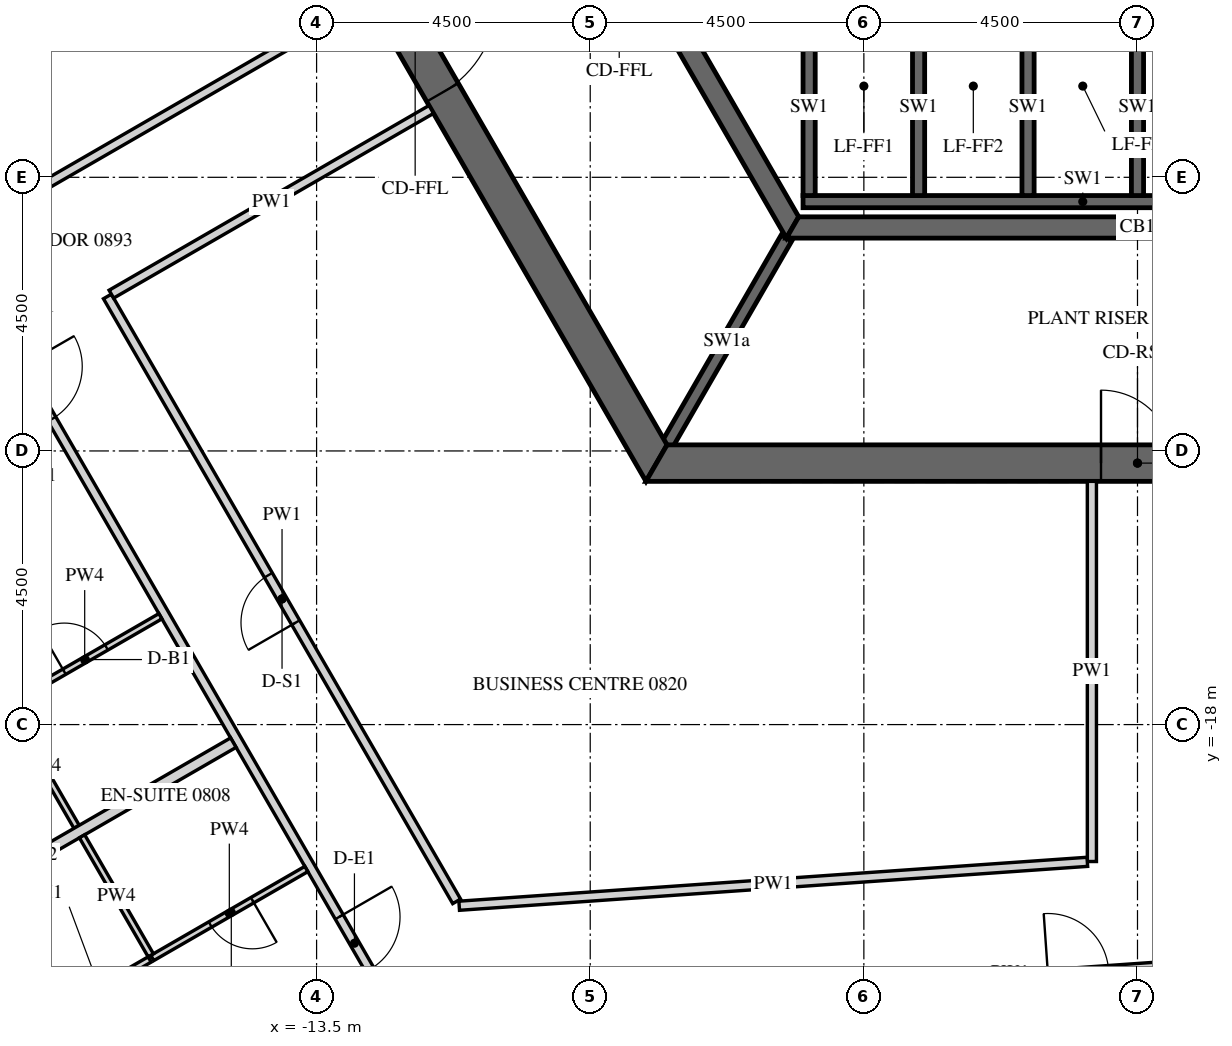
"""IFC4 building model, lengths in metres.
Left out: names, types, materials, properties, quantities, classifications, styles, units other than length and angle.
Written with IfcOpenShell. Run it as: python <this file> out.ifc"""

import sys

from ifc_helpers import new_model, si_unit, direction, frame, frame_2d, origin, place, context, subcontext, project, spatial, polyline, rectangle, outline, extrude, element, fill, save


model = new_model("IFC4")
c1 = context("Model", 3, precision=1e-05, world=origin(), true_north=direction((0.0, 1.0)))
c2 = subcontext(c1, "Body", "Model", "MODEL_VIEW")
j1 = project(units=[si_unit("LENGTHUNIT", "METRE"), si_unit("PLANEANGLEUNIT", "RADIAN")], contexts=[c1])
p1 = place(None, origin())
s1 = spatial("IfcSite", under=j1, at=p1, CompositionType="ELEMENT")
p2 = place(p1, origin())
s2 = spatial("IfcBuilding", under=s1, at=p2, CompositionType="ELEMENT")
p3 = place(p2, frame((0.0, 0.0, 111.6)))
s3 = spatial("IfcBuildingStorey", under=s2, at=p3, CompositionType="ELEMENT", Elevation=111.6)
p4 = place(p3, frame((-32.655, -2.89, -0.15), z_axis=(0.0, 0.0, 1.0), x_axis=(0.499997711317, -0.866026725152, 0.0)))
e1 = element("IfcWall", 1, at=p4, inside=s3, PredefinedType="SOLIDWALL", context=c2, shape_type="SweptSolid", body=[
    extrude(outline(polyline([(-0.022, -0.275), (30.097, -0.275), (30.045, 0.275), (0.022, 0.275), (-0.022, -0.275)])), origin(), (0.0, 0.0, 1.0), 3.9),
])
p5 = place(p4, frame((1.236, 0.0, 1.05)))
e2 = element("IfcOpeningElement", 2, at=p5, cuts=e1, PredefinedType="OPENING", context=c2, shape_type="SweptSolid", body=[
    extrude(rectangle(XDim=2.4, YDim=2.4, at=frame_2d((1.2, 1.2))), frame((0.0, 0.285, 0.0), z_axis=(0.0, -1.0, 0.0), x_axis=(1.0, 0.0, 0.0)), (0.0, 0.0, 1.0), 0.57),
])
p6 = place(p4, frame((4.835, 0.0, 1.05)))
e3 = element("IfcOpeningElement", 3, at=p6, cuts=e1, PredefinedType="OPENING", context=c2, shape_type="SweptSolid", body=[
    extrude(rectangle(XDim=2.4, YDim=2.4, at=frame_2d((1.2, 1.2))), frame((0.0, 0.285, 0.0), z_axis=(0.0, -1.0, 0.0), x_axis=(1.0, 0.0, 0.0)), (0.0, 0.0, 1.0), 0.57),
])
p7 = place(p4, frame((8.436, 0.0, 1.05)))
e4 = element("IfcOpeningElement", 4, at=p7, cuts=e1, PredefinedType="OPENING", context=c2, shape_type="SweptSolid", body=[
    extrude(rectangle(XDim=2.4, YDim=2.4, at=frame_2d((1.2, 1.2))), frame((0.0, 0.285, 0.0), z_axis=(0.0, -1.0, 0.0), x_axis=(1.0, 0.0, 0.0)), (0.0, 0.0, 1.0), 0.57),
])
p8 = place(p4, frame((12.035, 0.0, 1.05)))
e5 = element("IfcOpeningElement", 5, at=p8, cuts=e1, PredefinedType="OPENING", context=c2, shape_type="SweptSolid", body=[
    extrude(rectangle(XDim=2.4, YDim=2.4, at=frame_2d((1.2, 1.2))), frame((0.0, 0.285, 0.0), z_axis=(0.0, -1.0, 0.0), x_axis=(1.0, 0.0, 0.0)), (0.0, 0.0, 1.0), 0.57),
])
p9 = place(p4, frame((15.635, 0.0, 1.05)))
e6 = element("IfcOpeningElement", 6, at=p9, cuts=e1, PredefinedType="OPENING", context=c2, shape_type="SweptSolid", body=[
    extrude(rectangle(XDim=2.4, YDim=2.4, at=frame_2d((1.2, 1.2))), frame((0.0, 0.285, 0.0), z_axis=(0.0, -1.0, 0.0), x_axis=(1.0, 0.0, 0.0)), (0.0, 0.0, 1.0), 0.57),
])
p10 = place(p4, frame((19.236, 0.0, 1.05)))
e7 = element("IfcOpeningElement", 7, at=p10, cuts=e1, PredefinedType="OPENING", context=c2, shape_type="SweptSolid", body=[
    extrude(rectangle(XDim=2.4, YDim=2.4, at=frame_2d((1.2, 1.2))), frame((0.0, 0.285, 0.0), z_axis=(0.0, -1.0, 0.0), x_axis=(1.0, 0.0, 0.0)), (0.0, 0.0, 1.0), 0.57),
])
p11 = place(p4, frame((22.835, 0.0, 1.05)))
e8 = element("IfcOpeningElement", 8, at=p11, cuts=e1, PredefinedType="OPENING", context=c2, shape_type="SweptSolid", body=[
    extrude(rectangle(XDim=2.4, YDim=2.4, at=frame_2d((1.2, 1.2))), frame((0.0, 0.285, 0.0), z_axis=(0.0, -1.0, 0.0), x_axis=(1.0, 0.0, 0.0)), (0.0, 0.0, 1.0), 0.57),
])
p12 = place(p4, frame((26.436, 0.0, 1.05)))
e9 = element("IfcOpeningElement", 9, at=p12, cuts=e1, PredefinedType="OPENING", context=c2, shape_type="SweptSolid", body=[
    extrude(rectangle(XDim=2.4, YDim=2.4, at=frame_2d((1.2, 1.2))), frame((0.0, 0.285, 0.0), z_axis=(0.0, -1.0, 0.0), x_axis=(1.0, 0.0, 0.0)), (0.0, 0.0, 1.0), 0.57),
])
p13 = place(p3, frame((-15.819, 0.0, -0.15), z_axis=(0.0, 0.0, 1.0), x_axis=(0.499999880136, -0.866025472988, 0.0)))
e10 = element("IfcWall", 10, at=p13, inside=s3, PredefinedType="SHEAR", context=c2, shape_type="SweptSolid", body=[
    extrude(outline(polyline([(-0.173, -0.3), (15.993, -0.3), (15.646, 0.3), (0.173, 0.3), (-0.173, -0.3)])), origin(), (0.0, 0.0, 1.0), 3.9),
])
p14 = place(p13, frame((6.981, 0.0, 0.15)))
e11 = element("IfcOpeningElement", 11, at=p14, cuts=e10, PredefinedType="OPENING", context=c2, shape_type="SweptSolid", body=[
    extrude(rectangle(XDim=1.8, YDim=2.4, at=frame_2d((0.9, 1.2))), frame((0.0, 0.31, 0.0), z_axis=(0.0, -1.0, 0.0), x_axis=(1.0, 0.0, 0.0)), (0.0, 0.0, 1.0), 0.62),
])
p15 = place(p3, frame((-7.91, -13.7, -0.15), z_axis=(0.0, 0.0, 1.0), x_axis=(1.0, 0.0, 0.0)))
e12 = element("IfcWall", 12, at=p15, inside=s3, PredefinedType="SHEAR", context=c2, shape_type="SweptSolid", body=[
    extrude(outline(polyline([(-0.173, -0.3), (15.993, -0.3), (15.646, 0.3), (0.173, 0.3), (-0.173, -0.3)])), origin(), (0.0, 0.0, 1.0), 3.9),
])
p16 = place(p15, frame((7.31, 0.0, 0.15)))
e13 = element("IfcOpeningElement", 13, at=p16, cuts=e12, PredefinedType="OPENING", context=c2, shape_type="SweptSolid", body=[
    extrude(rectangle(XDim=1.2, YDim=2.4, at=frame_2d((0.6, 1.2))), frame((0.0, 0.31, 0.0), z_axis=(0.0, -1.0, 0.0), x_axis=(1.0, 0.0, 0.0)), (0.0, 0.0, 1.0), 0.62),
])
p17 = place(p3, frame((-11.345, 0.0, -0.15), z_axis=(0.0, 0.0, 1.0), x_axis=(0.499995046907, -0.866028263435, 0.0)))
e14 = element("IfcWall", 14, at=p17, inside=s3, PredefinedType="SHEAR", context=c2, shape_type="SweptSolid", body=[
    extrude(outline(polyline([(-0.101, -0.175), (11.446, -0.175), (11.244, 0.175), (0.101, 0.175), (-0.101, -0.175)])), origin(), (0.0, 0.0, 1.0), 3.9),
])
p18 = place(p17, frame((4.744, 0.0, 0.15)))
e15 = element("IfcOpeningElement", 15, at=p18, cuts=e14, PredefinedType="OPENING", context=c2, shape_type="SweptSolid", body=[
    extrude(rectangle(XDim=1.8, YDim=2.4, at=frame_2d((0.9, 1.2))), frame((0.0, 0.185, 0.0), z_axis=(0.0, -1.0, 0.0), x_axis=(1.0, 0.0, 0.0)), (0.0, 0.0, 1.0), 0.37),
])
p19 = place(p3, frame((-5.673, -9.825, -0.15), z_axis=(0.0, 0.0, 1.0), x_axis=(1.0, 0.0, 0.0)))
e16 = element("IfcWall", 16, at=p19, inside=s3, PredefinedType="SHEAR", context=c2, shape_type="SweptSolid", body=[
    extrude(outline(polyline([(-0.101, -0.175), (11.446, -0.175), (11.244, 0.175), (0.101, 0.175), (-0.101, -0.175)])), origin(), (0.0, 0.0, 1.0), 3.9),
])
p20 = place(p3, frame((-5.5, -9.4, -0.25), z_axis=(0.0, 0.0, 1.0), x_axis=(1.0, 0.0, 0.0)))
e17 = element("IfcWall", 17, at=p20, inside=s3, PredefinedType="SHEAR", context=c2, shape_type="SweptSolid", body=[
    extrude(rectangle(XDim=9.2, YDim=0.2, at=frame_2d((4.6, 0.0))), origin(), (0.0, 0.0, 1.0), 3.9),
])
for number, where, z_axis, x_axis in (
    (18, (-5.4, -9.3, -0.25), (0.0, 0.0, 1.0), (0.0, 1.0, 0.0)),
    (19, (-3.6, -9.3, -0.25), (0.0, 0.0, 1.0), (0.0, 1.0, 0.0)),
    (20, (-1.8, -9.3, -0.25), (0.0, 0.0, 1.0), (0.0, 1.0, 0.0)),
    (21, (0.0, -9.3, -0.25), (0.0, 0.0, 1.0), (0.0, 1.0, 0.0)),
):
    element("IfcWall", number, at=place(p3, frame(where, z_axis=z_axis, x_axis=x_axis)), inside=s3, PredefinedType="SHEAR", context=c2, shape_type="SweptSolid", body=[
        extrude(rectangle(XDim=2.9, YDim=0.2, at=frame_2d((1.45, 0.0))), origin(), (0.0, 0.0, 1.0), 3.9),
    ])
p21 = place(p3, frame((-5.773, -10.0, -0.15), z_axis=(0.0, 0.0, 1.0), x_axis=(-0.500038251005, -0.86600331843, 0.0)))
e22 = element("IfcWall", 22, at=p21, inside=s3, PredefinedType="SHEAR", context=c2, shape_type="SweptSolid", body=[
    extrude(rectangle(XDim=3.926, YDim=0.2, at=frame_2d((1.963, 0.0))), origin(), (0.0, 0.0, 1.0), 3.9),
])
p22 = place(p3, frame((-24.09, -2.175, 0.0), z_axis=(0.0, 0.0, 1.0), x_axis=(0.499996832073, -0.86602723278, 0.0)))
e23 = element("IfcWall", 23, at=p22, inside=s3, PredefinedType="PARTITIONING", context=c2, shape_type="SweptSolid", body=[
    extrude(rectangle(XDim=23.877, YDim=0.15, at=frame_2d((11.938, 0.0))), origin(), (0.0, 0.0, 1.0), 2.988),
])
p23 = place(p22, frame((4.643, 0.0, 0.0)))
e24 = element("IfcOpeningElement", 24, at=p23, cuts=e23, PredefinedType="OPENING", context=c2, shape_type="SweptSolid", body=[
    extrude(rectangle(XDim=1.0, YDim=2.1, at=frame_2d((0.5, 1.05))), frame((0.0, 0.085, 0.0), z_axis=(0.0, -1.0, 0.0), x_axis=(1.0, 0.0, 0.0)), (0.0, 0.0, 1.0), 0.17),
])
p24 = place(p22, frame((11.472, 0.0, 0.0)))
e25 = element("IfcOpeningElement", 25, at=p24, cuts=e23, PredefinedType="OPENING", context=c2, shape_type="SweptSolid", body=[
    extrude(rectangle(XDim=1.0, YDim=2.1, at=frame_2d((0.5, 1.05))), frame((0.0, 0.085, 0.0), z_axis=(0.0, -1.0, 0.0), x_axis=(1.0, 0.0, 0.0)), (0.0, 0.0, 1.0), 0.17),
])
p25 = place(p22, frame((21.925, 0.0, 0.0)))
e26 = element("IfcOpeningElement", 26, at=p25, cuts=e23, PredefinedType="OPENING", context=c2, shape_type="SweptSolid", body=[
    extrude(rectangle(XDim=1.0, YDim=2.1, at=frame_2d((0.5, 1.05))), frame((0.0, 0.085, 0.0), z_axis=(0.0, -1.0, 0.0), x_axis=(1.0, 0.0, 0.0)), (0.0, 0.0, 1.0), 0.17),
])
p26 = place(p3, frame((-12.068, -22.847, 0.0), z_axis=(0.0, 0.0, 1.0), x_axis=(0.99756437486, 0.069751831595, 0.0)))
e27 = element("IfcWall", 27, at=p26, inside=s3, PredefinedType="PARTITIONING", context=c2, shape_type="SweptSolid", body=[
    extrude(rectangle(XDim=22.002, YDim=0.15, at=frame_2d((11.001, 0.0))), origin(), (0.0, 0.0, 1.0), 2.988),
])
p27 = place(p26, frame((10.621, 0.0, 0.0)))
e28 = element("IfcOpeningElement", 28, at=p27, cuts=e27, PredefinedType="OPENING", context=c2, shape_type="SweptSolid", body=[
    extrude(rectangle(XDim=1.0, YDim=2.1, at=frame_2d((0.5, 1.05))), frame((0.0, 0.085, 0.0), z_axis=(0.0, -1.0, 0.0), x_axis=(1.0, 0.0, 0.0)), (0.0, 0.0, 1.0), 0.17),
])
p28 = place(p26, frame((20.852, 0.0, 0.0)))
e29 = element("IfcOpeningElement", 29, at=p28, cuts=e27, PredefinedType="OPENING", context=c2, shape_type="SweptSolid", body=[
    extrude(rectangle(XDim=1.0, YDim=2.1, at=frame_2d((0.5, 1.05))), frame((0.0, 0.085, 0.0), z_axis=(0.0, -1.0, 0.0), x_axis=(1.0, 0.0, 0.0)), (0.0, 0.0, 1.0), 0.17),
])
p29 = place(p3, frame((-12.664, -6.066, 0.0), z_axis=(0.0, 0.0, 1.0), x_axis=(-0.866023618125, -0.500003092839, 0.0)))
e30 = element("IfcWall", 30, at=p29, inside=s3, PredefinedType="PARTITIONING", context=c2, shape_type="SweptSolid", body=[
    extrude(rectangle(XDim=6.15, YDim=0.15, at=frame_2d((3.075, 0.0))), origin(), (0.0, 0.0, 1.0), 2.988),
])
p30 = place(p3, frame((-0.75, -14.0, 0.0), z_axis=(0.0, 0.0, 1.0), x_axis=(0.0, -1.0, 0.0)))
e31 = element("IfcWall", 31, at=p30, inside=s3, PredefinedType="PARTITIONING", context=c2, shape_type="SweptSolid", body=[
    extrude(rectangle(XDim=6.252, YDim=0.15, at=frame_2d((3.126, 0.0))), origin(), (0.0, 0.0, 1.0), 2.988),
])
p31 = place(p3, frame((-0.825, -20.257, 0.0), z_axis=(0.0, 0.0, 1.0), x_axis=(-0.9975635143, -0.069764137903, 0.0)))
e32 = element("IfcWall", 32, at=p31, inside=s3, PredefinedType="PARTITIONING", context=c2, shape_type="SweptSolid", body=[
    extrude(rectangle(XDim=10.355, YDim=0.15, at=frame_2d((5.177, 0.0))), origin(), (0.0, 0.0, 1.0), 2.988),
])
p32 = place(p3, frame((-11.197, -20.907, 0.0), z_axis=(0.0, 0.0, 1.0), x_axis=(-0.500004557924, 0.86602277225, 0.0)))
e33 = element("IfcWall", 33, at=p32, inside=s3, PredefinedType="PARTITIONING", context=c2, shape_type="SweptSolid", body=[
    extrude(rectangle(XDim=11.487, YDim=0.15, at=frame_2d((5.743, 0.0))), origin(), (0.0, 0.0, 1.0), 2.988),
])
p33 = place(p32, frame((5.293, 0.0, 0.0)))
e34 = element("IfcOpeningElement", 34, at=p33, cuts=e33, PredefinedType="OPENING", context=c2, shape_type="SweptSolid", body=[
    extrude(rectangle(XDim=0.9, YDim=2.1, at=frame_2d((0.45, 1.05))), frame((0.0, 0.085, 0.0), z_axis=(0.0, -1.0, 0.0), x_axis=(1.0, 0.0, 0.0)), (0.0, 0.0, 1.0), 0.17),
])
p34 = place(p3, frame((-16.875, -10.922, 0.0), z_axis=(0.0, 0.0, 1.0), x_axis=(0.866023634079, 0.500003065207, 0.0)))
e35 = element("IfcWall", 35, at=p34, inside=s3, PredefinedType="PARTITIONING", context=c2, shape_type="SweptSolid", body=[
    extrude(rectangle(XDim=6.075, YDim=0.15, at=frame_2d((3.038, 0.0))), origin(), (0.0, 0.0, 1.0), 2.988),
])
p35 = place(p3, frame((-17.447, -19.681, 0.0), z_axis=(0.0, 0.0, 1.0), x_axis=(-0.500015210774, 0.866016621662, 0.0)))
e36 = element("IfcWall", 36, at=p35, inside=s3, PredefinedType="PARTITIONING", context=c2, shape_type="SweptSolid", body=[
    extrude(rectangle(XDim=2.31, YDim=0.1, at=frame_2d((1.155, 0.0))), origin(), (0.0, 0.0, 1.0), 2.988),
])
p36 = place(p3, frame((-18.559, -17.656, 0.0), z_axis=(0.0, 0.0, 1.0), x_axis=(0.866039941686, 0.499974818771, 0.0)))
e37 = element("IfcWall", 37, at=p36, inside=s3, PredefinedType="PARTITIONING", context=c2, shape_type="SweptSolid", body=[
    extrude(rectangle(XDim=2.875, YDim=0.1, at=frame_2d((1.438, 0.0))), origin(), (0.0, 0.0, 1.0), 2.988),
])
p37 = place(p36, frame((1.05, 0.0, 0.0)))
e38 = element("IfcOpeningElement", 38, at=p37, cuts=e37, PredefinedType="OPENING", context=c2, shape_type="SweptSolid", body=[
    extrude(rectangle(XDim=0.8, YDim=2.1, at=frame_2d((0.4, 1.05))), frame((0.0, 0.06, 0.0), z_axis=(0.0, -1.0, 0.0), x_axis=(1.0, 0.0, 0.0)), (0.0, 0.0, 1.0), 0.12),
])
p38 = place(p3, frame((-21.299, -22.009, 0.0), z_axis=(0.0, 0.0, 1.0), x_axis=(0.866014745021, 0.500018461065, 0.0)))
e39 = element("IfcWall", 39, at=p38, inside=s3, PredefinedType="PARTITIONING", context=c2, shape_type="SweptSolid", body=[
    extrude(rectangle(XDim=7.425, YDim=0.18, at=frame_2d((3.712, 0.0))), origin(), (0.0, 0.0, 1.0), 2.988),
])
p39 = place(p3, frame((-13.669, -20.375, 0.0), z_axis=(0.0, 0.0, 1.0), x_axis=(-0.866046596414, -0.499963291492, 0.0)))
e40 = element("IfcWall", 40, at=p39, inside=s3, PredefinedType="PARTITIONING", context=c2, shape_type="SweptSolid", body=[
    extrude(rectangle(XDim=2.925, YDim=0.1, at=frame_2d((1.462, 0.0))), origin(), (0.0, 0.0, 1.0), 2.988),
])
p40 = place(p39, frame((1.025, 0.0, 0.0)))
e41 = element("IfcOpeningElement", 41, at=p40, cuts=e40, PredefinedType="OPENING", context=c2, shape_type="SweptSolid", body=[
    extrude(rectangle(XDim=0.8, YDim=2.1, at=frame_2d((0.4, 1.05))), frame((0.0, 0.06, 0.0), z_axis=(0.0, -1.0, 0.0), x_axis=(1.0, 0.0, 0.0)), (0.0, 0.0, 1.0), 0.12),
])
p41 = place(p3, frame((-16.245, -21.863, 0.0), z_axis=(0.0, 0.0, 1.0), x_axis=(-0.866000020948, -0.500043961785, 0.0)))
e42 = element("IfcWall", 42, at=p41, inside=s3, PredefinedType="PARTITIONING", context=c2, shape_type="SweptSolid", body=[
    extrude(rectangle(XDim=1.95, YDim=0.1, at=frame_2d((0.975, 0.0))), origin(), (0.0, 0.0, 1.0), 2.988),
])
p42 = place(p41, frame((0.5, 0.0, 0.0)))
e43 = element("IfcOpeningElement", 43, at=p42, cuts=e42, PredefinedType="OPENING", context=c2, shape_type="SweptSolid", body=[
    extrude(rectangle(XDim=0.9, YDim=2.1, at=frame_2d((0.45, 1.05))), frame((0.0, 0.06, 0.0), z_axis=(0.0, -1.0, 0.0), x_axis=(1.0, 0.0, 0.0)), (0.0, 0.0, 1.0), 0.12),
])
p43 = place(p3, frame((-17.357, -19.837, 0.0), z_axis=(0.0, 0.0, 1.0), x_axis=(0.49995000081, -0.866054268906, 0.0)))
e44 = element("IfcWall", 44, at=p43, inside=s3, PredefinedType="PARTITIONING", context=c2, shape_type="SweptSolid", body=[
    extrude(rectangle(XDim=2.26, YDim=0.1, at=frame_2d((1.13, 0.0))), origin(), (0.0, 0.0, 1.0), 2.988),
])
p44 = place(p14, origin())
e45 = element("IfcDoor", 45, at=p44, inside=s3, OperationType="DOUBLE_DOOR_SINGLE_SWING", PredefinedType="DOOR", context=c2, shape_type="SweptSolid", body=[
    extrude(rectangle(XDim=1.8, YDim=2.4, at=frame_2d((0.9, 1.2))), frame((0.0, 0.025, 0.0), z_axis=(0.0, -1.0, 0.0), x_axis=(1.0, 0.0, 0.0)), (0.0, 0.0, 1.0), 0.05),
])
fill(e11, e45)
p45 = place(p16, origin())
e46 = element("IfcDoor", 46, at=p45, inside=s3, OperationType="SINGLE_SWING_LEFT", PredefinedType="DOOR", context=c2, shape_type="SweptSolid", body=[
    extrude(rectangle(XDim=1.2, YDim=2.4, at=frame_2d((0.6, 1.2))), frame((0.0, 0.025, 0.0), z_axis=(0.0, -1.0, 0.0), x_axis=(1.0, 0.0, 0.0)), (0.0, 0.0, 1.0), 0.05),
])
fill(e13, e46)
p46 = place(p24, origin())
e47 = element("IfcDoor", 47, at=p46, inside=s3, OperationType="SINGLE_SWING_RIGHT", PredefinedType="DOOR", context=c2, shape_type="SweptSolid", body=[
    extrude(rectangle(XDim=1.0, YDim=2.1, at=frame_2d((0.5, 1.05))), frame((0.0, 0.025, 0.0), z_axis=(0.0, -1.0, 0.0), x_axis=(1.0, 0.0, 0.0)), (0.0, 0.0, 1.0), 0.05),
])
fill(e25, e47)
p47 = place(p37, origin())
e48 = element("IfcDoor", 48, at=p47, inside=s3, OperationType="SINGLE_SWING_LEFT", PredefinedType="DOOR", context=c2, shape_type="SweptSolid", body=[
    extrude(rectangle(XDim=0.8, YDim=2.1, at=frame_2d((0.4, 1.05))), frame((0.0, 0.025, 0.0), z_axis=(0.0, -1.0, 0.0), x_axis=(1.0, 0.0, 0.0)), (0.0, 0.0, 1.0), 0.05),
])
fill(e38, e48)
p48 = place(p25, origin())
e49 = element("IfcDoor", 49, at=p48, inside=s3, OperationType="SINGLE_SWING_RIGHT", PredefinedType="DOOR", context=c2, shape_type="SweptSolid", body=[
    extrude(rectangle(XDim=1.0, YDim=2.1, at=frame_2d((0.5, 1.05))), frame((0.0, 0.025, 0.0), z_axis=(0.0, -1.0, 0.0), x_axis=(1.0, 0.0, 0.0)), (0.0, 0.0, 1.0), 0.05),
])
fill(e26, e49)
p49 = place(p40, origin())
e50 = element("IfcDoor", 50, at=p49, inside=s3, OperationType="SINGLE_SWING_RIGHT", PredefinedType="DOOR", context=c2, shape_type="SweptSolid", body=[
    extrude(rectangle(XDim=0.8, YDim=2.1, at=frame_2d((0.4, 1.05))), frame((0.0, 0.025, 0.0), z_axis=(0.0, -1.0, 0.0), x_axis=(1.0, 0.0, 0.0)), (0.0, 0.0, 1.0), 0.05),
])
fill(e41, e50)
p50 = place(p33, origin())
e51 = element("IfcDoor", 51, at=p50, inside=s3, OperationType="SINGLE_SWING_RIGHT", PredefinedType="DOOR", context=c2, shape_type="SweptSolid", body=[
    extrude(rectangle(XDim=0.9, YDim=2.1, at=frame_2d((0.45, 1.05))), frame((0.0, 0.025, 0.0), z_axis=(0.0, -1.0, 0.0), x_axis=(1.0, 0.0, 0.0)), (0.0, 0.0, 1.0), 0.05),
])
fill(e34, e51)
save(model, sys.argv[1])
